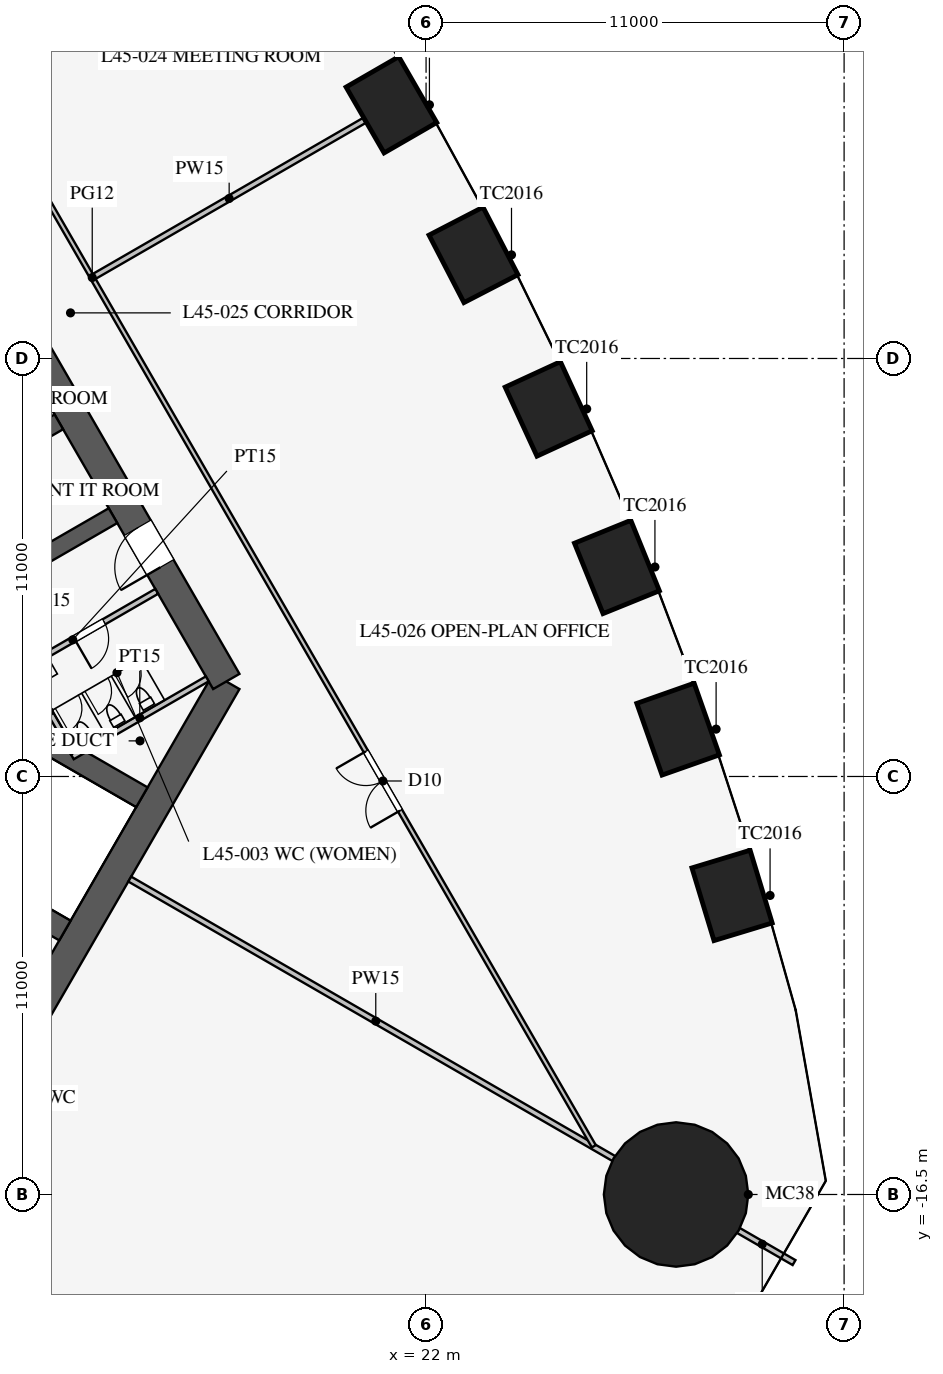
"""IFC4 building model, lengths in metres.
Left out: names, types, materials, properties, quantities, classifications, styles, units other than length and angle.
Written with IfcOpenShell. Run it as: python <this file> out.ifc"""

import sys

from ifc_helpers import new_model, si_unit, direction, frame, frame_2d, origin, origin_2d, place, context, subcontext, project, spatial, rectangle, circle, extrude, element, fill, save


model = new_model("IFC4")
c1 = context("Model", 3, precision=1e-05, world=origin(), true_north=direction((0.0, 1.0)))
c2 = subcontext(c1, "Body", "Model", "MODEL_VIEW")
j1 = project(units=[si_unit("LENGTHUNIT", "METRE"), si_unit("PLANEANGLEUNIT", "RADIAN")], contexts=[c1])
p1 = place(None, origin())
s1 = spatial("IfcSite", under=j1, at=p1, CompositionType="ELEMENT")
p2 = place(p1, origin())
s2 = spatial("IfcBuilding", under=s1, at=p2, CompositionType="ELEMENT")
p3 = place(p2, frame((0.0, 0.0, 198.1)))
s3 = spatial("IfcBuildingStorey", under=s2, at=p3, CompositionType="ELEMENT", Elevation=198.1)
for number, where, z_axis, x_axis in (
    (1, (30.052, -8.63, 0.0), (0.0, 0.0, 1.0), (-0.29, 0.957, 0.0)),
    (2, (28.632, -4.254, 0.0), (0.0, 0.0, 1.0), (-0.332, 0.943, 0.0)),
    (3, (27.022, 0.013, 0.0), (0.0, 0.0, 1.0), (-0.376, 0.927, 0.0)),
    (4, (25.227, 4.172, 0.0), (0.0, 0.0, 1.0), (-0.418, 0.908, 0.0)),
    (5, (23.248, 8.226, 0.0), (0.0, 0.0, 1.0), (-0.46, 0.888, 0.0)),
    (6, (21.088, 12.175, 0.0), (0.0, 0.0, 1.0), (-0.5, 0.866, 0.0)),
):
    element("IfcColumn", number, at=place(p3, frame(where, z_axis=z_axis, x_axis=x_axis)), inside=s3, PredefinedType="COLUMN", context=c2, shape_type="SweptSolid", body=[
        extrude(rectangle(XDim=2.0, YDim=1.6, at=origin_2d()), origin(), (0.0, 0.0, 1.0), 4.2),
    ])
p4 = place(p3, frame((28.579, -16.5, 0.0), z_axis=(0.0, 0.0, 1.0), x_axis=(1.0, 0.0, 0.0)))
e7 = element("IfcColumn", 7, at=p4, inside=s3, PredefinedType="COLUMN", context=c2, shape_type="SweptSolid", body=[
    extrude(circle(Radius=1.9, at=origin_2d()), origin(), (0.0, 0.0, 1.0), 4.2),
])
p5 = place(p3, frame((10.97, -13.0, 0.0), z_axis=(0.0, 0.0, 1.0), x_axis=(0.499995765644, 0.866027848477, 0.0)))
e8 = element("IfcWall", 8, at=p5, inside=s3, PredefinedType="SHEAR", context=c2, shape_type="SweptSolid", body=[
    extrude(rectangle(XDim=11.547, YDim=0.8, at=frame_2d((5.773, 0.0))), origin(), (0.0, 0.0, 1.0), 4.2),
])
p6 = place(p3, frame((16.743, -3.0, 0.0), z_axis=(0.0, 0.0, 1.0), x_axis=(-0.500002442456, 0.866023993627, 0.0)))
e9 = element("IfcWall", 9, at=p6, inside=s3, PredefinedType="SHEAR", context=c2, shape_type="SweptSolid", body=[
    extrude(rectangle(XDim=21.939, YDim=0.8, at=frame_2d((10.97, 0.0))), origin(), (0.0, 0.0, 1.0), 4.2),
])
p7 = place(p6, frame((17.27, 0.0, 0.0)))
e10 = element("IfcOpeningElement", 10, at=p7, cuts=e9, PredefinedType="OPENING", context=c2, shape_type="SweptSolid", body=[
    extrude(rectangle(XDim=1.2, YDim=2.1, at=frame_2d((0.6, 1.05))), frame((0.0, 0.41, 0.0), z_axis=(0.0, -1.0, 0.0), x_axis=(1.0, 0.0, 0.0)), (0.0, 0.0, 1.0), 0.82),
])
p8 = place(p6, frame((3.47, 0.0, 0.0)))
e11 = element("IfcOpeningElement", 11, at=p8, cuts=e9, PredefinedType="OPENING", context=c2, shape_type="SweptSolid", body=[
    extrude(rectangle(XDim=1.2, YDim=2.1, at=frame_2d((0.6, 1.05))), frame((0.0, 0.41, 0.0), z_axis=(0.0, -1.0, 0.0), x_axis=(1.0, 0.0, 0.0)), (0.0, 0.0, 1.0), 0.82),
])
for number, where, z_axis, x_axis in (
    (12, (11.532, 0.076, 0.0), (0.0, 0.0, 1.0), (0.866, 0.5, 0.0)),
    (13, (10.107, 2.544, 0.0), (0.0, 0.0, 1.0), (0.866, 0.5, 0.0)),
):
    element("IfcWall", number, at=place(p3, frame(where, z_axis=z_axis, x_axis=x_axis)), inside=s3, PredefinedType="SHEAR", context=c2, shape_type="SweptSolid", body=[
        extrude(rectangle(XDim=2.575, YDim=0.45, at=frame_2d((1.288, 0.0))), origin(), (0.0, 0.0, 1.0), 4.2),
    ])
for number, where, z_axis, x_axis in (
    (14, (4.638, -5.016, 0.0), (0.0, 0.0, 1.0), (0.866, -0.5, 0.0)),
    (15, (6.663, -1.509, 0.0), (0.0, 0.0, 1.0), (0.866, -0.5, 0.0)),
):
    element("IfcWall", number, at=place(p3, frame(where, z_axis=z_axis, x_axis=x_axis)), inside=s3, PredefinedType="SHEAR", context=c2, shape_type="SweptSolid", body=[
        extrude(rectangle(XDim=9.075, YDim=0.6, at=frame_2d((4.538, 0.0))), origin(), (0.0, 0.0, 1.0), 4.2),
    ])
p9 = place(p3, frame((10.495, -3.178, 0.0), z_axis=(0.0, 0.0, 1.0), x_axis=(0.86602216432, 0.500005610874, 0.0)))
e16 = element("IfcWall", 16, at=p9, inside=s3, PredefinedType="PARTITIONING", context=c2, shape_type="SweptSolid", body=[
    extrude(rectangle(XDim=5.1, YDim=0.15, at=frame_2d((2.55, 0.0))), origin(), (0.0, 0.0, 1.0), 4.0),
])
p10 = place(p9, frame((2.6, 0.0, 0.0)))
e17 = element("IfcOpeningElement", 17, at=p10, cuts=e16, PredefinedType="OPENING", context=c2, shape_type="SweptSolid", body=[
    extrude(rectangle(XDim=0.9, YDim=2.1, at=frame_2d((0.45, 1.05))), frame((0.0, 0.085, 0.0), z_axis=(0.0, -1.0, 0.0), x_axis=(1.0, 0.0, 0.0)), (0.0, 0.0, 1.0), 0.17),
])
p11 = place(p3, frame((12.691, -4.982, 0.0), z_axis=(0.0, 0.0, 1.0), x_axis=(0.8660249478, 0.500000789788, 0.0)))
e18 = element("IfcWall", 18, at=p11, inside=s3, PredefinedType="PARTITIONING", context=c2, shape_type="SweptSolid", body=[
    extrude(rectangle(XDim=4.1, YDim=0.15, at=frame_2d((2.05, 0.0))), origin(), (0.0, 0.0, 1.0), 4.0),
])
p12 = place(p3, frame((11.464, -2.706, 0.0), z_axis=(0.0, 0.0, 1.0), x_axis=(0.50001992892, -0.866013897511, 0.0)))
e19 = element("IfcWall", 19, at=p12, inside=s3, PredefinedType="PARTITIONING", context=c2, shape_type="SweptSolid", body=[
    extrude(rectangle(XDim=2.51, YDim=0.15, at=frame_2d((1.255, 0.0))), origin(), (0.0, 0.0, 1.0), 4.0),
])
p13 = place(p3, frame((14.203, -8.2, 0.0), z_axis=(0.0, 0.0, 1.0), x_axis=(0.866021600284, -0.500006587798, 0.0)))
e20 = element("IfcWall", 20, at=p13, inside=s3, PredefinedType="PARTITIONING", context=c2, shape_type="SweptSolid", body=[
    extrude(rectangle(XDim=14.95, YDim=0.15, at=frame_2d((7.475, 0.0))), origin(), (0.0, 0.0, 1.0), 2.4),
])
p14 = place(p3, frame((30.008, -17.325, 0.0), z_axis=(0.0, 0.0, 1.0), x_axis=(0.866013246922, -0.500021055713, 0.0)))
e21 = element("IfcWall", 21, at=p14, inside=s3, PredefinedType="PARTITIONING", context=c2, shape_type="SweptSolid", body=[
    extrude(rectangle(XDim=1.935, YDim=0.15, at=frame_2d((0.967, 0.0))), origin(), (0.0, 0.0, 1.0), 2.4),
])
p15 = place(p3, frame((13.268, 7.66, 0.0), z_axis=(0.0, 0.0, 1.0), x_axis=(0.866019499219, 0.500010226868, 0.0)))
e22 = element("IfcWall", 22, at=p15, inside=s3, PredefinedType="PARTITIONING", context=c2, shape_type="SweptSolid", body=[
    extrude(rectangle(XDim=8.2, YDim=0.15, at=frame_2d((4.1, 0.0))), origin(), (0.0, 0.0, 1.0), 2.992),
])
p16 = place(p3, frame((26.415, -15.231, 0.0), z_axis=(0.0, 0.0, 1.0), x_axis=(-0.50000091641, 0.866024874695, 0.0)))
e23 = element("IfcWall", 23, at=p16, inside=s3, PredefinedType="PARTITIONING", context=c2, shape_type="SweptSolid", body=[
    extrude(rectangle(XDim=52.796, YDim=0.12, at=frame_2d((26.398, 0.0))), origin(), (0.0, 0.0, 1.0), 2.9),
])
p17 = place(p16, frame((10.2, 0.0, 0.15)))
e24 = element("IfcOpeningElement", 24, at=p17, cuts=e23, PredefinedType="OPENING", context=c2, shape_type="SweptSolid", body=[
    extrude(rectangle(XDim=1.8, YDim=2.1, at=frame_2d((0.9, 1.05))), frame((0.0, 0.07, 0.0), z_axis=(0.0, -1.0, 0.0), x_axis=(1.0, 0.0, 0.0)), (0.0, 0.0, 1.0), 0.14),
])
p18 = place(p16, frame((40.8, 0.0, 0.15)))
e25 = element("IfcOpeningElement", 25, at=p18, cuts=e23, PredefinedType="OPENING", context=c2, shape_type="SweptSolid", body=[
    extrude(rectangle(XDim=1.8, YDim=2.1, at=frame_2d((0.9, 1.05))), frame((0.0, 0.07, 0.0), z_axis=(0.0, -1.0, 0.0), x_axis=(1.0, 0.0, 0.0)), (0.0, 0.0, 1.0), 0.14),
])
p19 = place(p10, frame((0.9, 0.0, 0.0), z_axis=(0.0, 0.0, 1.0), x_axis=(-1.0, 0.0, 0.0)))
e26 = element("IfcDoor", 26, at=p19, inside=s3, OperationType="SINGLE_SWING_RIGHT", PredefinedType="DOOR", context=c2, shape_type="SweptSolid", body=[
    extrude(rectangle(XDim=0.9, YDim=2.1, at=frame_2d((0.45, 1.05))), frame((0.0, 0.025, 0.0), z_axis=(0.0, -1.0, 0.0), x_axis=(1.0, 0.0, 0.0)), (0.0, 0.0, 1.0), 0.05),
])
fill(e17, e26)
p20 = place(p8, origin())
e27 = element("IfcDoor", 27, at=p20, inside=s3, OperationType="SINGLE_SWING_LEFT", PredefinedType="DOOR", context=c2, shape_type="SweptSolid", body=[
    extrude(rectangle(XDim=1.2, YDim=2.1, at=frame_2d((0.6, 1.05))), frame((0.0, 0.025, 0.0), z_axis=(0.0, -1.0, 0.0), x_axis=(1.0, 0.0, 0.0)), (0.0, 0.0, 1.0), 0.05),
])
fill(e11, e27)
p21 = place(p17, origin())
e28 = element("IfcDoor", 28, at=p21, inside=s3, OperationType="DOUBLE_DOOR_SINGLE_SWING", PredefinedType="DOOR", context=c2, shape_type="SweptSolid", body=[
    extrude(rectangle(XDim=1.8, YDim=2.1, at=frame_2d((0.9, 1.05))), frame((0.0, 0.025, 0.0), z_axis=(0.0, -1.0, 0.0), x_axis=(1.0, 0.0, 0.0)), (0.0, 0.0, 1.0), 0.05),
])
fill(e24, e28)
save(model, sys.argv[1])
